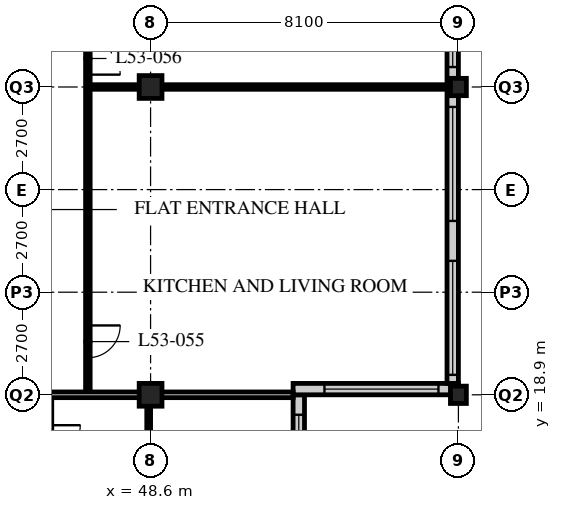
"""IFC4 building model, lengths in metres.
Left out: names, types, materials, properties, quantities, classifications, styles, units other than length and angle.
Written with IfcOpenShell. Run it as: python <this file> out.ifc"""

import sys

from ifc_helpers import new_model, si_unit, direction, frame, frame_2d, origin, origin_2d, place, context, subcontext, project, spatial, rectangle, hollow_rectangle, i_section, extrude, element, fill, save


model = new_model("IFC4")
c1 = context("Model", 3, precision=1e-05, world=origin(), true_north=direction((0.0, 1.0)))
c2 = subcontext(c1, "Body", "Model", "MODEL_VIEW")
j1 = project(units=[si_unit("LENGTHUNIT", "METRE"), si_unit("PLANEANGLEUNIT", "RADIAN")], contexts=[c1])
p1 = place(None, origin())
s1 = spatial("IfcSite", under=j1, at=p1, CompositionType="ELEMENT")
p2 = place(p1, origin())
s2 = spatial("IfcBuilding", under=s1, at=p2, CompositionType="ELEMENT")
p3 = place(p2, frame((0.0, 0.0, 206.4)))
s3 = spatial("IfcBuildingStorey", under=s2, at=p3, CompositionType="ELEMENT", Elevation=206.4)
for number, where, z_axis, x_axis in (
    (1, (48.6, 18.9, 0.0), (0.0, 0.0, 1.0), (1.0, 0.0, 0.0)),
    (2, (48.6, 27.0, 0.0), (0.0, 0.0, 1.0), (1.0, 0.0, 0.0)),
):
    element("IfcColumn", number, at=place(p3, frame(where, z_axis=z_axis, x_axis=x_axis)), inside=s3, PredefinedType="COLUMN", context=c2, shape_type="SweptSolid", body=[
        extrude(hollow_rectangle(XDim=0.6, YDim=0.6, WallThickness=0.05, at=origin_2d()), origin(), (0.0, 0.0, 1.0), 3.6),
    ])
for number, where, z_axis, x_axis in (
    (3, (56.7, 18.9, 0.0), (0.0, 0.0, 1.0), (1.0, 0.0, 0.0)),
    (4, (56.7, 27.0, 0.0), (0.0, 0.0, 1.0), (1.0, 0.0, 0.0)),
):
    element("IfcColumn", number, at=place(p3, frame(where, z_axis=z_axis, x_axis=x_axis)), inside=s3, PredefinedType="COLUMN", context=c2, shape_type="SweptSolid", body=[
        extrude(i_section(OverallWidth=0.418, OverallDepth=0.456, WebThickness=0.042, FlangeThickness=0.067, FilletRadius=0.015, at=origin_2d()), origin(), (0.0, 0.0, 1.0), 3.6),
    ])
p4 = place(p3, frame((52.5, 15.15, 0.0), z_axis=(0.0, 0.0, 1.0), x_axis=(0.0, 1.0, 0.0)))
e5 = element("IfcWall", 5, at=p4, inside=s3, PredefinedType="SOLIDWALL", context=c2, shape_type="SweptSolid", body=[
    extrude(rectangle(XDim=3.75, YDim=0.3, at=frame_2d((1.875, 0.0))), origin(), (0.0, 0.0, 1.0), 3.39),
])
p5 = place(p4, frame((0.225, 0.0, 0.6)))
e6 = element("IfcOpeningElement", 6, at=p5, cuts=e5, PredefinedType="OPENING", context=c2, shape_type="SweptSolid", body=[
    extrude(rectangle(XDim=3.0, YDim=2.0, at=frame_2d((1.5, 1.0))), frame((0.0, 0.16, 0.0), z_axis=(0.0, -1.0, 0.0), x_axis=(1.0, 0.0, 0.0)), (0.0, 0.0, 1.0), 0.32),
])
p6 = place(p3, frame((52.35, 19.05, 0.0), z_axis=(0.0, 0.0, 1.0), x_axis=(1.0, 0.0, 0.0)))
e7 = element("IfcWall", 7, at=p6, inside=s3, PredefinedType="SOLIDWALL", context=c2, shape_type="SweptSolid", body=[
    extrude(rectangle(XDim=4.35, YDim=0.3, at=frame_2d((2.175, 0.0))), origin(), (0.0, 0.0, 1.0), 3.39),
])
p7 = place(p6, frame((0.825, 0.0, 0.6)))
e8 = element("IfcOpeningElement", 8, at=p7, cuts=e7, PredefinedType="OPENING", context=c2, shape_type="SweptSolid", body=[
    extrude(rectangle(XDim=3.0, YDim=2.0, at=frame_2d((1.5, 1.0))), frame((0.0, 0.16, 0.0), z_axis=(0.0, -1.0, 0.0), x_axis=(1.0, 0.0, 0.0)), (0.0, 0.0, 1.0), 0.32),
])
p8 = place(p3, frame((56.55, 19.2, 0.0), z_axis=(0.0, 0.0, 1.0), x_axis=(0.0, 1.0, 0.0)))
e9 = element("IfcWall", 9, at=p8, inside=s3, PredefinedType="SOLIDWALL", context=c2, shape_type="SweptSolid", body=[
    extrude(rectangle(XDim=32.1, YDim=0.3, at=frame_2d((16.05, 0.0))), origin(), (0.0, 0.0, 1.0), 3.39),
])
p9 = place(p8, frame((0.225, 0.0, 0.6)))
e10 = element("IfcOpeningElement", 10, at=p9, cuts=e9, PredefinedType="OPENING", context=c2, shape_type="SweptSolid", body=[
    extrude(rectangle(XDim=3.0, YDim=2.4, at=frame_2d((1.5, 1.2))), frame((0.0, 0.16, 0.0), z_axis=(0.0, -1.0, 0.0), x_axis=(1.0, 0.0, 0.0)), (0.0, 0.0, 1.0), 0.32),
])
p10 = place(p8, frame((4.275, 0.0, 0.6)))
e11 = element("IfcOpeningElement", 11, at=p10, cuts=e9, PredefinedType="OPENING", context=c2, shape_type="SweptSolid", body=[
    extrude(rectangle(XDim=3.0, YDim=2.4, at=frame_2d((1.5, 1.2))), frame((0.0, 0.16, 0.0), z_axis=(0.0, -1.0, 0.0), x_axis=(1.0, 0.0, 0.0)), (0.0, 0.0, 1.0), 0.32),
])
p11 = place(p8, frame((8.325, 0.0, 0.6)))
e12 = element("IfcOpeningElement", 12, at=p11, cuts=e9, PredefinedType="OPENING", context=c2, shape_type="SweptSolid", body=[
    extrude(rectangle(XDim=3.0, YDim=2.4, at=frame_2d((1.5, 1.2))), frame((0.0, 0.16, 0.0), z_axis=(0.0, -1.0, 0.0), x_axis=(1.0, 0.0, 0.0)), (0.0, 0.0, 1.0), 0.32),
])
p12 = place(p8, frame((12.375, 0.0, 0.6)))
e13 = element("IfcOpeningElement", 13, at=p12, cuts=e9, PredefinedType="OPENING", context=c2, shape_type="SweptSolid", body=[
    extrude(rectangle(XDim=3.0, YDim=2.4, at=frame_2d((1.5, 1.2))), frame((0.0, 0.16, 0.0), z_axis=(0.0, -1.0, 0.0), x_axis=(1.0, 0.0, 0.0)), (0.0, 0.0, 1.0), 0.32),
])
p13 = place(p8, frame((16.425, 0.0, 0.6)))
e14 = element("IfcOpeningElement", 14, at=p13, cuts=e9, PredefinedType="OPENING", context=c2, shape_type="SweptSolid", body=[
    extrude(rectangle(XDim=3.0, YDim=2.4, at=frame_2d((1.5, 1.2))), frame((0.0, 0.16, 0.0), z_axis=(0.0, -1.0, 0.0), x_axis=(1.0, 0.0, 0.0)), (0.0, 0.0, 1.0), 0.32),
])
p14 = place(p8, frame((20.475, 0.0, 0.6)))
e15 = element("IfcOpeningElement", 15, at=p14, cuts=e9, PredefinedType="OPENING", context=c2, shape_type="SweptSolid", body=[
    extrude(rectangle(XDim=3.0, YDim=2.4, at=frame_2d((1.5, 1.2))), frame((0.0, 0.16, 0.0), z_axis=(0.0, -1.0, 0.0), x_axis=(1.0, 0.0, 0.0)), (0.0, 0.0, 1.0), 0.32),
])
p15 = place(p8, frame((24.525, 0.0, 0.6)))
e16 = element("IfcOpeningElement", 16, at=p15, cuts=e9, PredefinedType="OPENING", context=c2, shape_type="SweptSolid", body=[
    extrude(rectangle(XDim=3.0, YDim=2.4, at=frame_2d((1.5, 1.2))), frame((0.0, 0.16, 0.0), z_axis=(0.0, -1.0, 0.0), x_axis=(1.0, 0.0, 0.0)), (0.0, 0.0, 1.0), 0.32),
])
p16 = place(p8, frame((28.575, 0.0, 0.6)))
e17 = element("IfcOpeningElement", 17, at=p16, cuts=e9, PredefinedType="OPENING", context=c2, shape_type="SweptSolid", body=[
    extrude(rectangle(XDim=3.0, YDim=2.4, at=frame_2d((1.5, 1.2))), frame((0.0, 0.16, 0.0), z_axis=(0.0, -1.0, 0.0), x_axis=(1.0, 0.0, 0.0)), (0.0, 0.0, 1.0), 0.32),
])
p17 = place(p3, frame((46.95, 18.9, 0.0), z_axis=(0.0, 0.0, 1.0), x_axis=(0.0, 1.0, 0.0)))
e18 = element("IfcWall", 18, at=p17, inside=s3, PredefinedType="PARTITIONING", context=c2, shape_type="SweptSolid", body=[
    extrude(rectangle(XDim=24.3, YDim=0.12, at=frame_2d((12.15, 0.0))), origin(), (0.0, 0.0, 1.0), 3.39),
])
p18 = place(p17, frame((0.975, 0.0, 0.0)))
e19 = element("IfcOpeningElement", 19, at=p18, cuts=e18, PredefinedType="OPENING", context=c2, shape_type="SweptSolid", body=[
    extrude(rectangle(XDim=0.85, YDim=2.1, at=frame_2d((0.425, 1.05))), frame((0.0, 0.07, 0.0), z_axis=(0.0, -1.0, 0.0), x_axis=(1.0, 0.0, 0.0)), (0.0, 0.0, 1.0), 0.14),
])
p19 = place(p17, frame((8.425, 0.0, 0.0)))
e20 = element("IfcOpeningElement", 20, at=p19, cuts=e18, PredefinedType="OPENING", context=c2, shape_type="SweptSolid", body=[
    extrude(rectangle(XDim=0.85, YDim=2.1, at=frame_2d((0.425, 1.05))), frame((0.0, 0.07, 0.0), z_axis=(0.0, -1.0, 0.0), x_axis=(1.0, 0.0, 0.0)), (0.0, 0.0, 1.0), 0.14),
])
p20 = place(p17, frame((13.125, 0.0, 0.0)))
e21 = element("IfcOpeningElement", 21, at=p20, cuts=e18, PredefinedType="OPENING", context=c2, shape_type="SweptSolid", body=[
    extrude(rectangle(XDim=0.85, YDim=2.1, at=frame_2d((0.425, 1.05))), frame((0.0, 0.07, 0.0), z_axis=(0.0, -1.0, 0.0), x_axis=(1.0, 0.0, 0.0)), (0.0, 0.0, 1.0), 0.14),
])
p21 = place(p17, frame((20.575, 0.0, 0.0)))
e22 = element("IfcOpeningElement", 22, at=p21, cuts=e18, PredefinedType="OPENING", context=c2, shape_type="SweptSolid", body=[
    extrude(rectangle(XDim=0.85, YDim=2.1, at=frame_2d((0.425, 1.05))), frame((0.0, 0.07, 0.0), z_axis=(0.0, -1.0, 0.0), x_axis=(1.0, 0.0, 0.0)), (0.0, 0.0, 1.0), 0.14),
])
p22 = place(p3, frame((46.95, 27.0, 0.0), z_axis=(0.0, 0.0, 1.0), x_axis=(1.0, 0.0, 0.0)))
e23 = element("IfcWall", 23, at=p22, inside=s3, PredefinedType="PARTITIONING", context=c2, shape_type="SweptSolid", body=[
    extrude(rectangle(XDim=9.45, YDim=0.12, at=frame_2d((4.725, 0.0))), origin(), (0.0, 0.0, 1.0), 2.778),
])
p23 = place(p3, frame((48.55, 18.9, 0.0), z_axis=(0.0, 0.0, 1.0), x_axis=(0.0, -1.0, 0.0)))
e24 = element("IfcWall", 24, at=p23, inside=s3, PredefinedType="PARTITIONING", context=c2, shape_type="SweptSolid", body=[
    extrude(rectangle(XDim=2.4, YDim=0.1, at=frame_2d((1.2, 0.0))), origin(), (0.0, 0.0, 1.0), 2.778),
])
p24 = place(p3, frame((44.55, 18.9, 0.0), z_axis=(0.0, 0.0, 1.0), x_axis=(1.0, 0.0, 0.0)))
e25 = element("IfcWall", 25, at=p24, inside=s3, PredefinedType="PARTITIONING", context=c2, shape_type="SweptSolid", body=[
    extrude(rectangle(XDim=7.8, YDim=0.15, at=frame_2d((3.9, 0.0))), origin(), (0.0, 0.0, 1.0), 2.778),
])
p25 = place(p5, origin())
e26 = element("IfcWindow", 26, at=p25, inside=s3, PartitioningType="SINGLE_PANEL", PredefinedType="WINDOW", context=c2, shape_type="SweptSolid", body=[
    extrude(rectangle(XDim=3.0, YDim=2.0, at=frame_2d((1.5, 1.0))), frame((0.0, 0.03, 0.0), z_axis=(0.0, -1.0, 0.0), x_axis=(1.0, 0.0, 0.0)), (0.0, 0.0, 1.0), 0.06),
])
fill(e6, e26)
p26 = place(p7, origin())
e27 = element("IfcWindow", 27, at=p26, inside=s3, PartitioningType="SINGLE_PANEL", PredefinedType="WINDOW", context=c2, shape_type="SweptSolid", body=[
    extrude(rectangle(XDim=3.0, YDim=2.0, at=frame_2d((1.5, 1.0))), frame((0.0, 0.03, 0.0), z_axis=(0.0, -1.0, 0.0), x_axis=(1.0, 0.0, 0.0)), (0.0, 0.0, 1.0), 0.06),
])
fill(e8, e27)
p27 = place(p9, origin())
e28 = element("IfcWindow", 28, at=p27, inside=s3, PartitioningType="SINGLE_PANEL", PredefinedType="WINDOW", context=c2, shape_type="SweptSolid", body=[
    extrude(rectangle(XDim=3.0, YDim=2.4, at=frame_2d((1.5, 1.2))), frame((0.0, 0.03, 0.0), z_axis=(0.0, -1.0, 0.0), x_axis=(1.0, 0.0, 0.0)), (0.0, 0.0, 1.0), 0.06),
])
fill(e10, e28)
p28 = place(p10, origin())
e29 = element("IfcWindow", 29, at=p28, inside=s3, PartitioningType="SINGLE_PANEL", PredefinedType="WINDOW", context=c2, shape_type="SweptSolid", body=[
    extrude(rectangle(XDim=3.0, YDim=2.4, at=frame_2d((1.5, 1.2))), frame((0.0, 0.03, 0.0), z_axis=(0.0, -1.0, 0.0), x_axis=(1.0, 0.0, 0.0)), (0.0, 0.0, 1.0), 0.06),
])
fill(e11, e29)
p29 = place(p11, origin())
e30 = element("IfcWindow", 30, at=p29, inside=s3, PartitioningType="SINGLE_PANEL", PredefinedType="WINDOW", context=c2, shape_type="SweptSolid", body=[
    extrude(rectangle(XDim=3.0, YDim=2.4, at=frame_2d((1.5, 1.2))), frame((0.0, 0.03, 0.0), z_axis=(0.0, -1.0, 0.0), x_axis=(1.0, 0.0, 0.0)), (0.0, 0.0, 1.0), 0.06),
])
fill(e12, e30)
p30 = place(p18, origin())
e31 = element("IfcDoor", 31, at=p30, inside=s3, OperationType="SINGLE_SWING_LEFT", PredefinedType="DOOR", context=c2, shape_type="SweptSolid", body=[
    extrude(rectangle(XDim=0.85, YDim=2.1, at=frame_2d((0.425, 1.05))), frame((0.0, 0.025, 0.0), z_axis=(0.0, -1.0, 0.0), x_axis=(1.0, 0.0, 0.0)), (0.0, 0.0, 1.0), 0.05),
])
fill(e19, e31)
p31 = place(p19, origin())
e32 = element("IfcDoor", 32, at=p31, inside=s3, OperationType="SINGLE_SWING_RIGHT", PredefinedType="DOOR", context=c2, shape_type="SweptSolid", body=[
    extrude(rectangle(XDim=0.85, YDim=2.1, at=frame_2d((0.425, 1.05))), frame((0.0, 0.025, 0.0), z_axis=(0.0, -1.0, 0.0), x_axis=(1.0, 0.0, 0.0)), (0.0, 0.0, 1.0), 0.05),
])
fill(e20, e32)
save(model, sys.argv[1])
